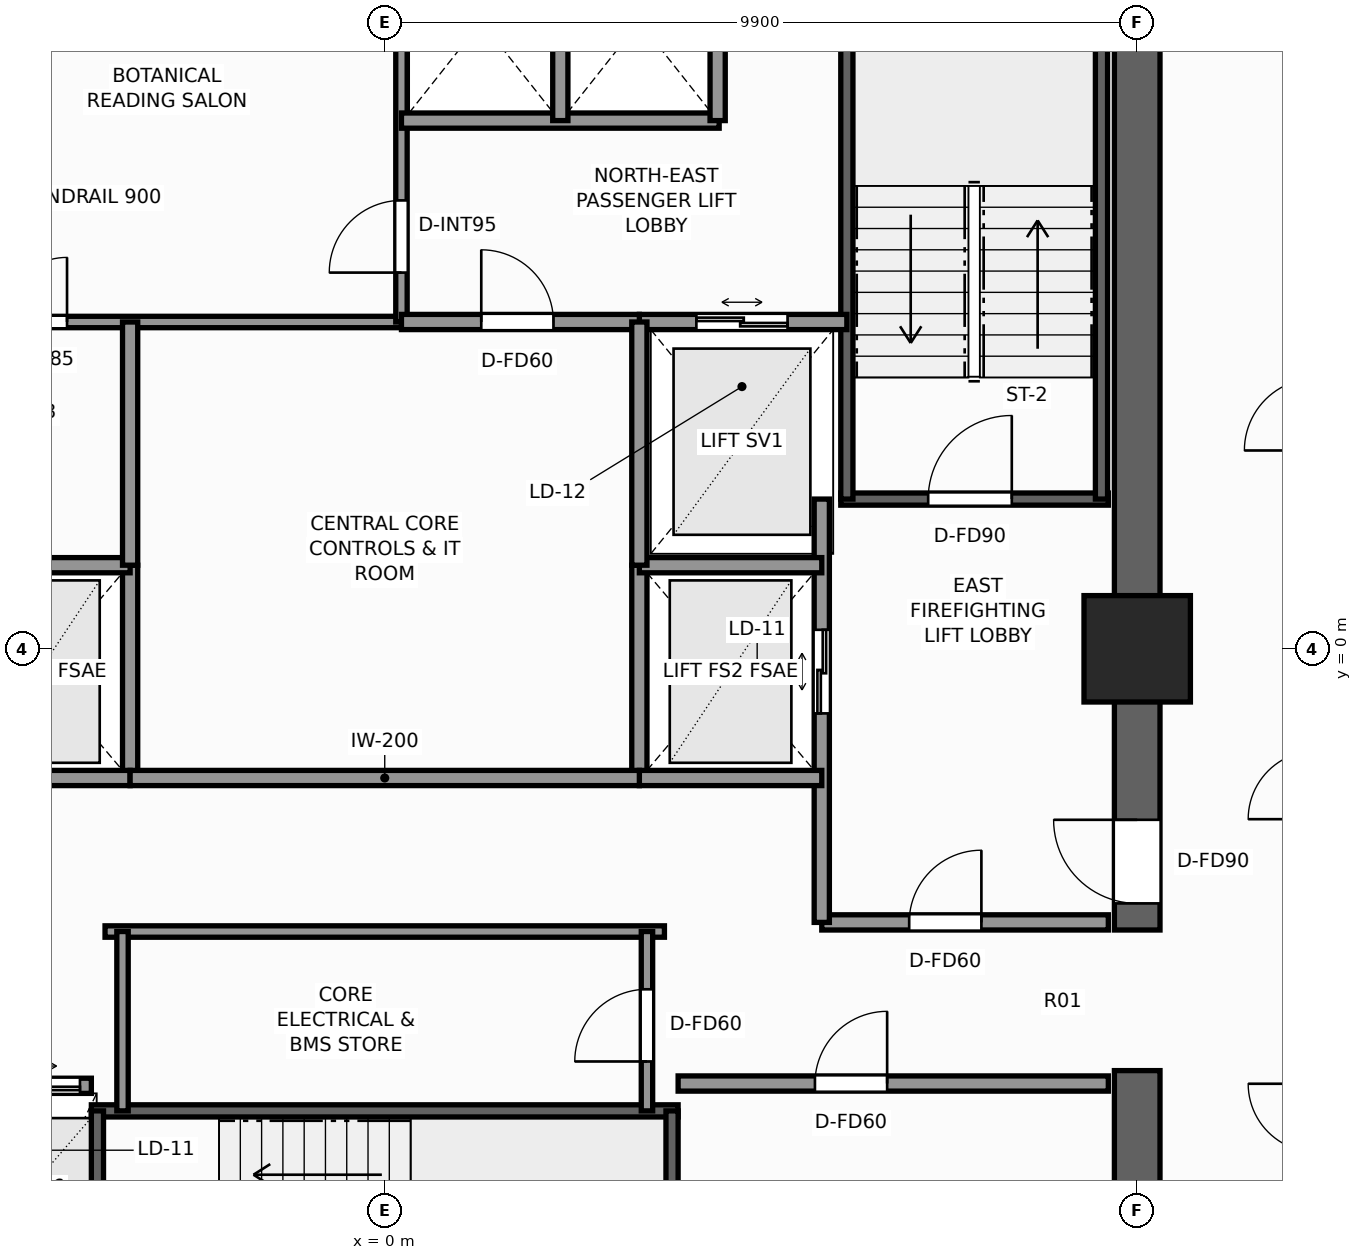
"""IFC4 building model, lengths in metres.
Left out: names, types, materials, properties, quantities, classifications, styles, units other than length and angle.
Written with IfcOpenShell. Run it as: python <this file> out.ifc"""

import sys

from ifc_helpers import new_model, si_unit, direction, frame, frame_2d, origin, origin_2d, place, context, subcontext, project, spatial, rectangle, extrude, element, fill, save


model = new_model("IFC4")
c1 = context("Model", 3, precision=1e-05, world=origin(), true_north=direction((0.0, 1.0)))
c2 = subcontext(c1, "Body", "Model", "MODEL_VIEW")
j1 = project(units=[si_unit("LENGTHUNIT", "METRE"), si_unit("PLANEANGLEUNIT", "RADIAN")], contexts=[c1])
p1 = place(None, origin())
s1 = spatial("IfcSite", under=j1, at=p1, CompositionType="ELEMENT")
p2 = place(p1, origin())
s2 = spatial("IfcBuilding", under=s1, at=p2, CompositionType="ELEMENT")
p3 = place(p2, frame((0.0, 0.0, 105.2)))
s3 = spatial("IfcBuildingStorey", under=s2, at=p3, CompositionType="ELEMENT", Elevation=105.2)
p4 = place(p3, frame((9.9, -9.6, 0.0), z_axis=(0.0, 0.0, 1.0), x_axis=(0.0, 1.0, 0.0)))
e1 = element("IfcWall", 1, at=p4, inside=s3, PredefinedType="SHEAR", context=c2, shape_type="SweptSolid", body=[
    extrude(rectangle(XDim=4.05, YDim=0.6, at=frame_2d((2.025, 0.0))), origin(), (0.0, 0.0, 1.0), 3.3),
])
p5 = place(p3, frame((9.9, -3.7, 0.0), z_axis=(0.0, 0.0, 1.0), x_axis=(0.0, 1.0, 0.0)))
e2 = element("IfcWall", 2, at=p5, inside=s3, PredefinedType="SHEAR", context=c2, shape_type="SweptSolid", body=[
    extrude(rectangle(XDim=13.3, YDim=0.6, at=frame_2d((6.65, 0.0))), origin(), (0.0, 0.0, 1.0), 3.3),
])
p6 = place(p5, frame((0.35, 0.0, 0.0)))
e3 = element("IfcOpeningElement", 3, at=p6, cuts=e2, PredefinedType="OPENING", context=c2, shape_type="SweptSolid", body=[
    extrude(rectangle(XDim=1.1, YDim=2.2, at=frame_2d((0.55, 1.1))), frame((0.0, 0.31, 0.0), z_axis=(0.0, -1.0, 0.0), x_axis=(1.0, 0.0, 0.0)), (0.0, 0.0, 1.0), 0.62),
])
p7 = place(p3, frame((9.9, 0.0, 0.0), z_axis=(0.0, 0.0, 1.0), x_axis=(1.0, 0.0, 0.0)))
e4 = element("IfcColumn", 4, at=p7, inside=s3, PredefinedType="COLUMN", context=c2, shape_type="SweptSolid", body=[
    extrude(rectangle(XDim=1.4, YDim=1.4, at=origin_2d()), origin(), (0.0, 0.0, 1.0), 3.3),
])
p8 = place(p3, frame((6.0, 1.97, 0.0), z_axis=(0.0, 0.0, 1.0), x_axis=(1.0, 0.0, 0.0)))
e5 = element("IfcWall", 5, at=p8, inside=s3, PredefinedType="SHEAR", context=c2, shape_type="SweptSolid", body=[
    extrude(rectangle(XDim=3.52, YDim=0.16, at=frame_2d((1.76, 0.0))), origin(), (0.0, 0.0, 1.0), 3.3),
])
p9 = place(p8, frame((1.15, 0.0, 0.0)))
e6 = element("IfcOpeningElement", 6, at=p9, cuts=e5, PredefinedType="OPENING", context=c2, shape_type="SweptSolid", body=[
    extrude(rectangle(XDim=1.1, YDim=2.2, at=frame_2d((0.55, 1.1))), frame((0.0, 0.09, 0.0), z_axis=(0.0, -1.0, 0.0), x_axis=(1.0, 0.0, 0.0)), (0.0, 0.0, 1.0), 0.18),
])
for number, where, z_axis, x_axis in (
    (7, (6.08, 1.97, 0.0), (0.0, 0.0, 1.0), (0.0, 1.0, 0.0)),
    (8, (9.43, 1.97, 0.0), (0.0, 0.0, 1.0), (0.0, 1.0, 0.0)),
):
    element("IfcWall", number, at=place(p3, frame(where, z_axis=z_axis, x_axis=x_axis)), inside=s3, PredefinedType="SHEAR", context=c2, shape_type="SweptSolid", body=[
        extrude(rectangle(XDim=7.56, YDim=0.16, at=frame_2d((3.78, 0.0))), origin(), (0.0, 0.0, 1.0), 3.3),
    ])
p10 = place(p3, frame((-3.86, -6.08, 0.0), z_axis=(0.0, 0.0, 1.0), x_axis=(1.0, 0.0, 0.0)))
e9 = element("IfcWall", 9, at=p10, inside=s3, PredefinedType="SHEAR", context=c2, shape_type="SweptSolid", body=[
    extrude(rectangle(XDim=7.72, YDim=0.16, at=frame_2d((3.86, 0.0))), origin(), (0.0, 0.0, 1.0), 3.3),
])
for number, where, z_axis, x_axis in (
    (10, (-3.78, -9.43, 0.0), (0.0, 0.0, 1.0), (0.0, 1.0, 0.0)),
    (11, (3.78, -9.43, 0.0), (0.0, 0.0, 1.0), (0.0, 1.0, 0.0)),
):
    element("IfcWall", number, at=place(p3, frame(where, z_axis=z_axis, x_axis=x_axis)), inside=s3, PredefinedType="SHEAR", context=c2, shape_type="SweptSolid", body=[
        extrude(rectangle(XDim=3.35, YDim=0.16, at=frame_2d((1.675, 0.0))), origin(), (0.0, 0.0, 1.0), 3.3),
    ])
p11 = place(p3, frame((-3.35, -1.7, 0.0), z_axis=(0.0, 0.0, 1.0), x_axis=(0.0, 1.0, 0.0)))
e12 = element("IfcWall", 12, at=p11, inside=s3, PredefinedType="SOLIDWALL", context=c2, shape_type="SweptSolid", body=[
    extrude(rectangle(XDim=2.8, YDim=0.2, at=frame_2d((1.4, 0.0))), origin(), (0.0, 0.0, 1.0), 2.715),
])
for number, where, z_axis, x_axis in (
    (13, (-5.75, -1.7, 0.0), (0.0, 0.0, 1.0), (1.0, 0.0, 0.0)),
    (14, (-5.75, 1.1, 0.0), (0.0, 0.0, 1.0), (1.0, 0.0, 0.0)),
):
    element("IfcWall", number, at=place(p3, frame(where, z_axis=z_axis, x_axis=x_axis)), inside=s3, PredefinedType="SOLIDWALL", context=c2, shape_type="SweptSolid", body=[
        extrude(rectangle(XDim=2.4, YDim=0.2, at=frame_2d((1.2, 0.0))), origin(), (0.0, 0.0, 1.0), 3.08),
    ])
p12 = place(p3, frame((5.75, -3.6, 0.0), z_axis=(0.0, 0.0, 1.0), x_axis=(1.0, 0.0, 0.0)))
e15 = element("IfcWall", 15, at=p12, inside=s3, PredefinedType="SOLIDWALL", context=c2, shape_type="SweptSolid", body=[
    extrude(rectangle(XDim=3.77, YDim=0.2, at=frame_2d((1.885, 0.0))), origin(), (0.0, 0.0, 1.0), 3.08),
])
p13 = place(p12, frame((1.15, 0.0, 0.0)))
e16 = element("IfcOpeningElement", 16, at=p13, cuts=e15, PredefinedType="OPENING", context=c2, shape_type="SweptSolid", body=[
    extrude(rectangle(XDim=0.95, YDim=2.06, at=frame_2d((0.475, 1.03))), frame((0.0, 0.11, 0.0), z_axis=(0.0, -1.0, 0.0), x_axis=(1.0, 0.0, 0.0)), (0.0, 0.0, 1.0), 0.22),
])
p14 = place(p3, frame((5.75, -3.6, 0.0), z_axis=(0.0, 0.0, 1.0), x_axis=(0.0, 1.0, 0.0)))
e17 = element("IfcWall", 17, at=p14, inside=s3, PredefinedType="SOLIDWALL", context=c2, shape_type="SweptSolid", body=[
    extrude(rectangle(XDim=5.57, YDim=0.2, at=frame_2d((2.785, 0.0))), origin(), (0.0, 0.0, 1.0), 2.715),
])
p15 = place(p14, frame((2.75, 0.0, 0.0)))
e18 = element("IfcOpeningElement", 18, at=p15, cuts=e17, PredefinedType="OPENING", context=c2, shape_type="SweptSolid", body=[
    extrude(rectangle(XDim=1.1, YDim=2.2, at=frame_2d((0.55, 1.1))), frame((0.0, 0.11, 0.0), z_axis=(0.0, -1.0, 0.0), x_axis=(1.0, 0.0, 0.0)), (0.0, 0.0, 1.0), 0.22),
])
p16 = place(p3, frame((3.35, -1.7, 0.0), z_axis=(0.0, 0.0, 1.0), x_axis=(0.0, 1.0, 0.0)))
e19 = element("IfcWall", 19, at=p16, inside=s3, PredefinedType="SOLIDWALL", context=c2, shape_type="SweptSolid", body=[
    extrude(rectangle(XDim=2.8, YDim=0.2, at=frame_2d((1.4, 0.0))), origin(), (0.0, 0.0, 1.0), 2.715),
])
for number, where, z_axis, x_axis in (
    (20, (3.35, -1.7, 0.0), (0.0, 0.0, 1.0), (1.0, 0.0, 0.0)),
    (21, (3.35, 1.1, 0.0), (0.0, 0.0, 1.0), (1.0, 0.0, 0.0)),
):
    element("IfcWall", number, at=place(p3, frame(where, z_axis=z_axis, x_axis=x_axis)), inside=s3, PredefinedType="SOLIDWALL", context=c2, shape_type="SweptSolid", body=[
        extrude(rectangle(XDim=2.4, YDim=0.2, at=frame_2d((1.2, 0.0))), origin(), (0.0, 0.0, 1.0), 3.08),
    ])
p17 = place(p3, frame((3.35, 4.3, 0.0), z_axis=(0.0, 0.0, 1.0), x_axis=(1.0, 0.0, 0.0)))
e22 = element("IfcWall", 22, at=p17, inside=s3, PredefinedType="SOLIDWALL", context=c2, shape_type="SweptSolid", body=[
    extrude(rectangle(XDim=2.73, YDim=0.2, at=frame_2d((1.365, 0.0))), origin(), (0.0, 0.0, 1.0), 3.08),
])
p18 = place(p17, frame((0.75, 0.0, 0.0)))
e23 = element("IfcOpeningElement", 23, at=p18, cuts=e22, PredefinedType="OPENING", context=c2, shape_type="SweptSolid", body=[
    extrude(rectangle(XDim=1.2, YDim=2.25, at=frame_2d((0.6, 1.125))), frame((0.0, 0.11, 0.0), z_axis=(0.0, -1.0, 0.0), x_axis=(1.0, 0.0, 0.0)), (0.0, 0.0, 1.0), 0.22),
])
p19 = place(p3, frame((-6.08, 4.3, 0.0), z_axis=(0.0, 0.0, 1.0), x_axis=(1.0, 0.0, 0.0)))
e24 = element("IfcWall", 24, at=p19, inside=s3, PredefinedType="PARTITIONING", context=c2, shape_type="SweptSolid", body=[
    extrude(rectangle(XDim=6.3, YDim=0.15, at=frame_2d((3.15, 0.0))), origin(), (0.0, 0.0, 1.0), 3.08),
])
p20 = place(p19, frame((1.05, 0.0, 0.0)))
e25 = element("IfcOpeningElement", 25, at=p20, cuts=e24, PredefinedType="OPENING", context=c2, shape_type="SweptSolid", body=[
    extrude(rectangle(XDim=0.85, YDim=2.03, at=frame_2d((0.425, 1.015))), frame((0.0, 0.085, 0.0), z_axis=(0.0, -1.0, 0.0), x_axis=(1.0, 0.0, 0.0)), (0.0, 0.0, 1.0), 0.17),
])
p21 = place(p3, frame((0.22, 4.3, 0.0), z_axis=(0.0, 0.0, 1.0), x_axis=(0.0, 1.0, 0.0)))
e26 = element("IfcWall", 26, at=p21, inside=s3, PredefinedType="PARTITIONING", context=c2, shape_type="SweptSolid", body=[
    extrude(rectangle(XDim=5.22, YDim=0.15, at=frame_2d((2.61, 0.0))), origin(), (0.0, 0.0, 1.0), 3.08),
])
p22 = place(p21, frame((0.65, 0.0, 0.0)))
e27 = element("IfcOpeningElement", 27, at=p22, cuts=e26, PredefinedType="OPENING", context=c2, shape_type="SweptSolid", body=[
    extrude(rectangle(XDim=0.95, YDim=2.06, at=frame_2d((0.475, 1.03))), frame((0.0, 0.085, 0.0), z_axis=(0.0, -1.0, 0.0), x_axis=(1.0, 0.0, 0.0)), (0.0, 0.0, 1.0), 0.17),
])
p23 = place(p3, frame((0.22, 6.95, 0.0), z_axis=(0.0, 0.0, 1.0), x_axis=(1.0, 0.0, 0.0)))
e28 = element("IfcWall", 28, at=p23, inside=s3, PredefinedType="SOLIDWALL", context=c2, shape_type="SweptSolid", body=[
    extrude(rectangle(XDim=4.18, YDim=0.2, at=frame_2d((2.09, 0.0))), origin(), (0.0, 0.0, 1.0), 3.08),
])
for number, where, z_axis, x_axis in (
    (29, (4.38, 6.95, 0.0), (0.0, 0.0, 1.0), (0.0, 1.0, 0.0)),
    (30, (2.31, 6.95, 0.0), (0.0, 0.0, 1.0), (0.0, 1.0, 0.0)),
):
    element("IfcWall", number, at=place(p3, frame(where, z_axis=z_axis, x_axis=x_axis)), inside=s3, PredefinedType="SOLIDWALL", context=c2, shape_type="SweptSolid", body=[
        extrude(rectangle(XDim=2.57, YDim=0.2, at=frame_2d((1.285, 0.0))), origin(), (0.0, 0.0, 1.0), 3.08),
    ])
p24 = place(p3, frame((-9.52, -5.75, 0.0), z_axis=(0.0, 0.0, 1.0), x_axis=(1.0, 0.0, 0.0)))
e31 = element("IfcWall", 31, at=p24, inside=s3, PredefinedType="SOLIDWALL", context=c2, shape_type="SweptSolid", body=[
    extrude(rectangle(XDim=5.66, YDim=0.2, at=frame_2d((2.83, 0.0))), origin(), (0.0, 0.0, 1.0), 3.08),
])
p25 = place(p24, frame((0.55, 0.0, 0.0)))
e32 = element("IfcOpeningElement", 32, at=p25, cuts=e31, PredefinedType="OPENING", context=c2, shape_type="SweptSolid", body=[
    extrude(rectangle(XDim=1.1, YDim=2.2, at=frame_2d((0.55, 1.1))), frame((0.0, 0.11, 0.0), z_axis=(0.0, -1.0, 0.0), x_axis=(1.0, 0.0, 0.0)), (0.0, 0.0, 1.0), 0.22),
])
p26 = place(p24, frame((2.48, 0.0, 0.0)))
e33 = element("IfcOpeningElement", 33, at=p26, cuts=e31, PredefinedType="OPENING", context=c2, shape_type="SweptSolid", body=[
    extrude(rectangle(XDim=1.1, YDim=2.2, at=frame_2d((0.55, 1.1))), frame((0.0, 0.11, 0.0), z_axis=(0.0, -1.0, 0.0), x_axis=(1.0, 0.0, 0.0)), (0.0, 0.0, 1.0), 0.22),
])
p27 = place(p24, frame((4.41, 0.0, 0.0)))
e34 = element("IfcOpeningElement", 34, at=p27, cuts=e31, PredefinedType="OPENING", context=c2, shape_type="SweptSolid", body=[
    extrude(rectangle(XDim=1.1, YDim=2.2, at=frame_2d((0.55, 1.1))), frame((0.0, 0.11, 0.0), z_axis=(0.0, -1.0, 0.0), x_axis=(1.0, 0.0, 0.0)), (0.0, 0.0, 1.0), 0.22),
])
p28 = place(p3, frame((3.86, -5.72, 0.0), z_axis=(0.0, 0.0, 1.0), x_axis=(1.0, 0.0, 0.0)))
e35 = element("IfcWall", 35, at=p28, inside=s3, PredefinedType="SOLIDWALL", context=c2, shape_type="SweptSolid", body=[
    extrude(rectangle(XDim=5.66, YDim=0.2, at=frame_2d((2.83, 0.0))), origin(), (0.0, 0.0, 1.0), 3.08),
])
p29 = place(p28, frame((1.8, 0.0, 0.0)))
e36 = element("IfcOpeningElement", 36, at=p29, cuts=e35, PredefinedType="OPENING", context=c2, shape_type="SweptSolid", body=[
    extrude(rectangle(XDim=0.95, YDim=2.06, at=frame_2d((0.475, 1.03))), frame((0.0, 0.11, 0.0), z_axis=(0.0, -1.0, 0.0), x_axis=(1.0, 0.0, 0.0)), (0.0, 0.0, 1.0), 0.22),
])
p30 = place(p3, frame((0.22, 4.3, 0.0), z_axis=(0.0, 0.0, 1.0), x_axis=(1.0, 0.0, 0.0)))
e37 = element("IfcWall", 37, at=p30, inside=s3, PredefinedType="SOLIDWALL", context=c2, shape_type="SweptSolid", body=[
    extrude(rectangle(XDim=3.13, YDim=0.2, at=frame_2d((1.565, 0.0))), origin(), (0.0, 0.0, 1.0), 3.08),
])
p31 = place(p30, frame((1.05, 0.0, 0.0)))
e38 = element("IfcOpeningElement", 38, at=p31, cuts=e37, PredefinedType="OPENING", context=c2, shape_type="SweptSolid", body=[
    extrude(rectangle(XDim=0.95, YDim=2.06, at=frame_2d((0.475, 1.03))), frame((0.0, 0.11, 0.0), z_axis=(0.0, -1.0, 0.0), x_axis=(1.0, 0.0, 0.0)), (0.0, 0.0, 1.0), 0.22),
])
p32 = place(p3, frame((-3.35, -1.7, 0.0), z_axis=(0.0, 0.0, 1.0), x_axis=(1.0, 0.0, 0.0)))
e39 = element("IfcWall", 39, at=p32, inside=s3, PredefinedType="SOLIDWALL", context=c2, shape_type="SweptSolid", body=[
    extrude(rectangle(XDim=6.7, YDim=0.2, at=frame_2d((3.35, 0.0))), origin(), (0.0, 0.0, 1.0), 2.715),
])
for number, where, z_axis, x_axis in (
    (40, (-3.35, 1.1, 0.0), (0.0, 0.0, 1.0), (0.0, 1.0, 0.0)),
    (41, (3.35, 1.1, 0.0), (0.0, 0.0, 1.0), (0.0, 1.0, 0.0)),
):
    element("IfcWall", number, at=place(p3, frame(where, z_axis=z_axis, x_axis=x_axis)), inside=s3, PredefinedType="SOLIDWALL", context=c2, shape_type="SweptSolid", body=[
        extrude(rectangle(XDim=3.2, YDim=0.2, at=frame_2d((1.6, 0.0))), origin(), (0.0, 0.0, 1.0), 2.715),
    ])
p33 = place(p3, frame((-3.68, -3.72, 0.0), z_axis=(0.0, 0.0, 1.0), x_axis=(1.0, 0.0, 0.0)))
e42 = element("IfcWall", 42, at=p33, inside=s3, PredefinedType="PARTITIONING", context=c2, shape_type="SweptSolid", body=[
    extrude(rectangle(XDim=7.36, YDim=0.15, at=frame_2d((3.68, 0.0))), origin(), (0.0, 0.0, 1.0), 3.08),
])
p34 = place(p3, frame((3.45, -6.08, 0.0), z_axis=(0.0, 0.0, 1.0), x_axis=(0.0, 1.0, 0.0)))
e43 = element("IfcWall", 43, at=p34, inside=s3, PredefinedType="PARTITIONING", context=c2, shape_type="SweptSolid", body=[
    extrude(rectangle(XDim=2.36, YDim=0.15, at=frame_2d((1.18, 0.0))), origin(), (0.0, 0.0, 1.0), 3.08),
])
p35 = place(p34, frame((0.65, 0.0, 0.0)))
e44 = element("IfcOpeningElement", 44, at=p35, cuts=e43, PredefinedType="OPENING", context=c2, shape_type="SweptSolid", body=[
    extrude(rectangle(XDim=0.95, YDim=2.06, at=frame_2d((0.475, 1.03))), frame((0.0, 0.085, 0.0), z_axis=(0.0, -1.0, 0.0), x_axis=(1.0, 0.0, 0.0)), (0.0, 0.0, 1.0), 0.17),
])
p36 = place(p3, frame((-3.45, -6.08, 0.0), z_axis=(0.0, 0.0, 1.0), x_axis=(0.0, 1.0, 0.0)))
e45 = element("IfcWall", 45, at=p36, inside=s3, PredefinedType="PARTITIONING", context=c2, shape_type="SweptSolid", body=[
    extrude(rectangle(XDim=2.36, YDim=0.15, at=frame_2d((1.18, 0.0))), origin(), (0.0, 0.0, 1.0), 3.08),
])
p37 = place(p9, origin())
e46 = element("IfcDoor", 46, at=p37, inside=s3, OperationType="SINGLE_SWING_RIGHT", PredefinedType="DOOR", context=c2, shape_type="SweptSolid", body=[
    extrude(rectangle(XDim=1.1, YDim=2.2, at=frame_2d((0.55, 1.1))), frame((0.0, 0.025, 0.0), z_axis=(0.0, -1.0, 0.0), x_axis=(1.0, 0.0, 0.0)), (0.0, 0.0, 1.0), 0.05),
])
fill(e6, e46)
p38 = place(p6, origin())
e47 = element("IfcDoor", 47, at=p38, inside=s3, OperationType="SINGLE_SWING_RIGHT", PredefinedType="DOOR", context=c2, shape_type="SweptSolid", body=[
    extrude(rectangle(XDim=1.1, YDim=2.2, at=frame_2d((0.55, 1.1))), frame((0.0, 0.025, 0.0), z_axis=(0.0, -1.0, 0.0), x_axis=(1.0, 0.0, 0.0)), (0.0, 0.0, 1.0), 0.05),
])
fill(e3, e47)
p39 = place(p15, origin())
e48 = element("IfcDoor", 48, at=p39, inside=s3, OperationType="DOUBLE_DOOR_SLIDING", PredefinedType="DOOR", context=c2, shape_type="SweptSolid", body=[
    extrude(rectangle(XDim=1.1, YDim=2.2, at=frame_2d((0.55, 1.1))), frame((0.0, 0.025, 0.0), z_axis=(0.0, -1.0, 0.0), x_axis=(1.0, 0.0, 0.0)), (0.0, 0.0, 1.0), 0.05),
])
fill(e18, e48)
p40 = place(p18, origin())
e49 = element("IfcDoor", 49, at=p40, inside=s3, OperationType="DOUBLE_DOOR_SLIDING", PredefinedType="DOOR", context=c2, shape_type="SweptSolid", body=[
    extrude(rectangle(XDim=1.2, YDim=2.25, at=frame_2d((0.6, 1.125))), frame((0.0, 0.025, 0.0), z_axis=(0.0, -1.0, 0.0), x_axis=(1.0, 0.0, 0.0)), (0.0, 0.0, 1.0), 0.05),
])
fill(e23, e49)
p41 = place(p22, origin())
e50 = element("IfcDoor", 50, at=p41, inside=s3, OperationType="SINGLE_SWING_LEFT", PredefinedType="DOOR", context=c2, shape_type="SweptSolid", body=[
    extrude(rectangle(XDim=0.95, YDim=2.06, at=frame_2d((0.475, 1.03))), frame((0.0, 0.025, 0.0), z_axis=(0.0, -1.0, 0.0), x_axis=(1.0, 0.0, 0.0)), (0.0, 0.0, 1.0), 0.05),
])
fill(e27, e50)
p42 = place(p27, origin())
e51 = element("IfcDoor", 51, at=p42, inside=s3, OperationType="DOUBLE_DOOR_SLIDING", PredefinedType="DOOR", context=c2, shape_type="SweptSolid", body=[
    extrude(rectangle(XDim=1.1, YDim=2.2, at=frame_2d((0.55, 1.1))), frame((0.0, 0.025, 0.0), z_axis=(0.0, -1.0, 0.0), x_axis=(1.0, 0.0, 0.0)), (0.0, 0.0, 1.0), 0.05),
])
fill(e34, e51)
p43 = place(p29, origin())
e52 = element("IfcDoor", 52, at=p43, inside=s3, OperationType="SINGLE_SWING_RIGHT", PredefinedType="DOOR", context=c2, shape_type="SweptSolid", body=[
    extrude(rectangle(XDim=0.95, YDim=2.06, at=frame_2d((0.475, 1.03))), frame((0.0, 0.025, 0.0), z_axis=(0.0, -1.0, 0.0), x_axis=(1.0, 0.0, 0.0)), (0.0, 0.0, 1.0), 0.05),
])
fill(e36, e52)
p44 = place(p13, origin())
e53 = element("IfcDoor", 53, at=p44, inside=s3, OperationType="SINGLE_SWING_RIGHT", PredefinedType="DOOR", context=c2, shape_type="SweptSolid", body=[
    extrude(rectangle(XDim=0.95, YDim=2.06, at=frame_2d((0.475, 1.03))), frame((0.0, 0.025, 0.0), z_axis=(0.0, -1.0, 0.0), x_axis=(1.0, 0.0, 0.0)), (0.0, 0.0, 1.0), 0.05),
])
fill(e16, e53)
p45 = place(p31, origin())
e54 = element("IfcDoor", 54, at=p45, inside=s3, OperationType="SINGLE_SWING_LEFT", PredefinedType="DOOR", context=c2, shape_type="SweptSolid", body=[
    extrude(rectangle(XDim=0.95, YDim=2.06, at=frame_2d((0.475, 1.03))), frame((0.0, 0.025, 0.0), z_axis=(0.0, -1.0, 0.0), x_axis=(1.0, 0.0, 0.0)), (0.0, 0.0, 1.0), 0.05),
])
fill(e38, e54)
p46 = place(p35, origin())
e55 = element("IfcDoor", 55, at=p46, inside=s3, OperationType="SINGLE_SWING_LEFT", PredefinedType="DOOR", context=c2, shape_type="SweptSolid", body=[
    extrude(rectangle(XDim=0.95, YDim=2.06, at=frame_2d((0.475, 1.03))), frame((0.0, 0.025, 0.0), z_axis=(0.0, -1.0, 0.0), x_axis=(1.0, 0.0, 0.0)), (0.0, 0.0, 1.0), 0.05),
])
fill(e44, e55)
p47 = place(p20, origin())
e56 = element("IfcDoor", 56, at=p47, inside=s3, OperationType="SINGLE_SWING_RIGHT", PredefinedType="DOOR", context=c2, shape_type="SweptSolid", body=[
    extrude(rectangle(XDim=0.85, YDim=2.03, at=frame_2d((0.425, 1.015))), frame((0.0, 0.025, 0.0), z_axis=(0.0, -1.0, 0.0), x_axis=(1.0, 0.0, 0.0)), (0.0, 0.0, 1.0), 0.05),
])
fill(e25, e56)
save(model, sys.argv[1])
